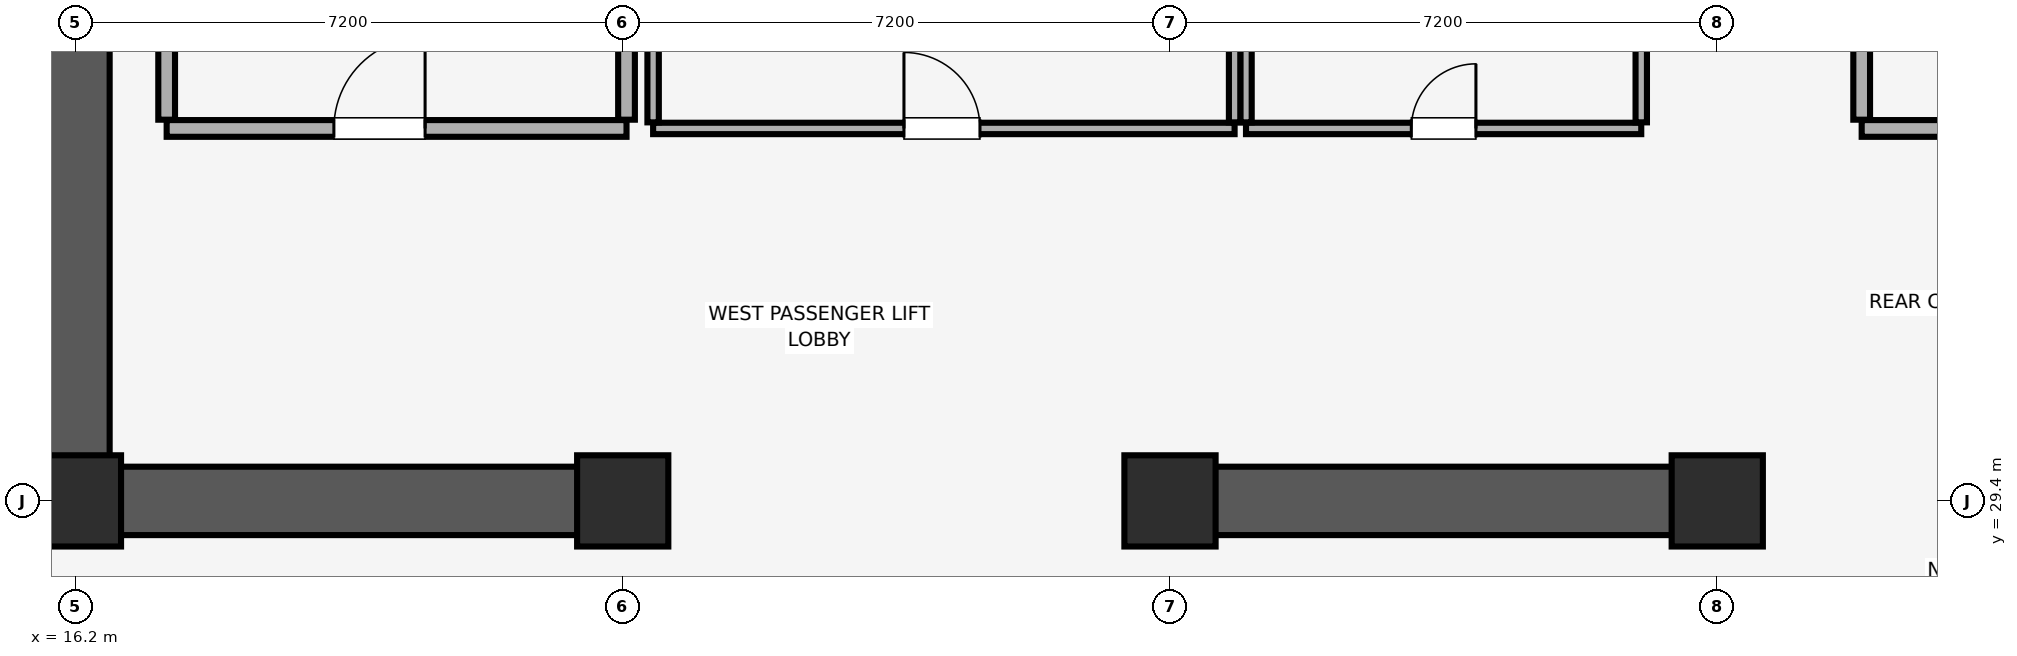
"""IFC4 building model, lengths in metres.
Left out: names, types, materials, properties, quantities, classifications, styles, units other than length and angle.
Written with IfcOpenShell. Run it as: python <this file> out.ifc"""

import sys

from ifc_helpers import new_model, si_unit, direction, frame, frame_2d, origin, origin_2d, place, context, subcontext, project, spatial, rectangle, extrude, element, fill, save


model = new_model("IFC4")
c1 = context("Model", 3, precision=1e-05, world=origin(), true_north=direction((0.0, 1.0)))
c2 = subcontext(c1, "Body", "Model", "MODEL_VIEW")
j1 = project(units=[si_unit("LENGTHUNIT", "METRE"), si_unit("PLANEANGLEUNIT", "RADIAN")], contexts=[c1])
p1 = place(None, origin())
s1 = spatial("IfcSite", under=j1, at=p1, CompositionType="ELEMENT")
p2 = place(p1, origin())
s2 = spatial("IfcBuilding", under=s1, at=p2, CompositionType="ELEMENT")
p3 = place(p2, frame((0.0, 0.0, 180.95)))
s3 = spatial("IfcBuildingStorey", under=s2, at=p3, CompositionType="ELEMENT", Elevation=180.95)
for number, where, z_axis, x_axis in (
    (1, (16.2, 29.4, 0.0), (0.0, 0.0, 1.0), (1.0, 0.0, 0.0)),
    (2, (23.4, 29.4, 0.0), (0.0, 0.0, 1.0), (1.0, 0.0, 0.0)),
    (3, (30.6, 29.4, 0.0), (0.0, 0.0, 1.0), (1.0, 0.0, 0.0)),
    (4, (37.8, 29.4, 0.0), (0.0, 0.0, 1.0), (1.0, 0.0, 0.0)),
):
    element("IfcColumn", number, at=place(p3, frame(where, z_axis=z_axis, x_axis=x_axis)), inside=s3, PredefinedType="COLUMN", context=c2, shape_type="SweptSolid", body=[
        extrude(rectangle(XDim=1.2, YDim=1.2, at=origin_2d()), origin(), (0.0, 0.0, 1.0), 3.45),
    ])
p4 = place(p3, frame((16.2, 29.4, 0.0), z_axis=(0.0, 0.0, 1.0), x_axis=(0.0, 1.0, 0.0)))
e5 = element("IfcWall", 5, at=p4, inside=s3, PredefinedType="SHEAR", context=c2, shape_type="SweptSolid", body=[
    extrude(rectangle(XDim=19.2, YDim=0.9, at=frame_2d((9.6, 0.0))), origin(), (0.0, 0.0, 1.0), 3.45),
])
p5 = place(p3, frame((16.655, 29.4, 0.0), z_axis=(0.0, 0.0, 1.0), x_axis=(1.0, 0.0, 0.0)))
e6 = element("IfcWall", 6, at=p5, inside=s3, PredefinedType="SHEAR", context=c2, shape_type="SweptSolid", body=[
    extrude(rectangle(XDim=6.945, YDim=0.9, at=frame_2d((3.473, 0.0))), origin(), (0.0, 0.0, 1.0), 3.45),
])
p6 = place(p3, frame((30.4, 29.4, 0.0), z_axis=(0.0, 0.0, 1.0), x_axis=(1.0, 0.0, 0.0)))
e7 = element("IfcWall", 7, at=p6, inside=s3, PredefinedType="SHEAR", context=c2, shape_type="SweptSolid", body=[
    extrude(rectangle(XDim=7.6, YDim=0.9, at=frame_2d((3.8, 0.0))), origin(), (0.0, 0.0, 1.0), 3.45),
])
p7 = place(p3, frame((17.4, 34.3, 0.0), z_axis=(0.0, 0.0, 1.0), x_axis=(1.0, 0.0, 0.0)))
e8 = element("IfcWall", 8, at=p7, inside=s3, PredefinedType="PARTITIONING", context=c2, shape_type="SweptSolid", body=[
    extrude(rectangle(XDim=6.05, YDim=0.22, at=frame_2d((3.025, 0.0))), origin(), (0.0, 0.0, 1.0), 3.45),
])
p8 = place(p7, frame((2.2, 0.0, 0.0)))
e9 = element("IfcOpeningElement", 9, at=p8, cuts=e8, PredefinedType="OPENING", context=c2, shape_type="SweptSolid", body=[
    extrude(rectangle(XDim=1.2, YDim=2.15, at=frame_2d((0.6, 1.075))), frame((0.0, 0.12, 0.0), z_axis=(0.0, -1.0, 0.0), x_axis=(1.0, 0.0, 0.0)), (0.0, 0.0, 1.0), 0.24),
])
p9 = place(p3, frame((17.4, 34.415, 0.0), z_axis=(0.0, 0.0, 1.0), x_axis=(0.0, 1.0, 0.0)))
e10 = element("IfcWall", 10, at=p9, inside=s3, PredefinedType="PARTITIONING", context=c2, shape_type="SweptSolid", body=[
    extrude(rectangle(XDim=5.43, YDim=0.22, at=frame_2d((2.715, 0.0))), origin(), (0.0, 0.0, 1.0), 3.45),
])
p10 = place(p3, frame((23.45, 34.415, 0.0), z_axis=(0.0, 0.0, 1.0), x_axis=(0.0, 1.0, 0.0)))
e11 = element("IfcWall", 11, at=p10, inside=s3, PredefinedType="PARTITIONING", context=c2, shape_type="SweptSolid", body=[
    extrude(rectangle(XDim=5.64, YDim=0.22, at=frame_2d((2.82, 0.0))), origin(), (0.0, 0.0, 1.0), 3.45),
])
p11 = place(p3, frame((39.7, 34.3, 0.0), z_axis=(0.0, 0.0, 1.0), x_axis=(1.0, 0.0, 0.0)))
e12 = element("IfcWall", 12, at=p11, inside=s3, PredefinedType="PARTITIONING", context=c2, shape_type="SweptSolid", body=[
    extrude(rectangle(XDim=4.6, YDim=0.22, at=frame_2d((2.3, 0.0))), origin(), (0.0, 0.0, 1.0), 3.45),
])
p12 = place(p11, frame((1.7, 0.0, 0.0)))
e13 = element("IfcOpeningElement", 13, at=p12, cuts=e12, PredefinedType="OPENING", context=c2, shape_type="SweptSolid", body=[
    extrude(rectangle(XDim=1.2, YDim=2.15, at=frame_2d((0.6, 1.075))), frame((0.0, 0.12, 0.0), z_axis=(0.0, -1.0, 0.0), x_axis=(1.0, 0.0, 0.0)), (0.0, 0.0, 1.0), 0.24),
])
p13 = place(p3, frame((39.7, 34.415, 0.0), z_axis=(0.0, 0.0, 1.0), x_axis=(0.0, 1.0, 0.0)))
e14 = element("IfcWall", 14, at=p13, inside=s3, PredefinedType="PARTITIONING", context=c2, shape_type="SweptSolid", body=[
    extrude(rectangle(XDim=5.785, YDim=0.22, at=frame_2d((2.893, 0.0))), origin(), (0.0, 0.0, 1.0), 3.45),
])
p14 = place(p3, frame((31.6, 34.3, 0.0), z_axis=(0.0, 0.0, 1.0), x_axis=(1.0, 0.0, 0.0)))
e15 = element("IfcWall", 15, at=p14, inside=s3, PredefinedType="PARTITIONING", context=c2, shape_type="SweptSolid", body=[
    extrude(rectangle(XDim=5.2, YDim=0.15, at=frame_2d((2.6, 0.0))), origin(), (0.0, 0.0, 1.0), 3.45),
])
p15 = place(p14, frame((2.175, 0.0, 0.0)))
e16 = element("IfcOpeningElement", 16, at=p15, cuts=e15, PredefinedType="OPENING", context=c2, shape_type="SweptSolid", body=[
    extrude(rectangle(XDim=0.85, YDim=2.1, at=frame_2d((0.425, 1.05))), frame((0.0, 0.085, 0.0), z_axis=(0.0, -1.0, 0.0), x_axis=(1.0, 0.0, 0.0)), (0.0, 0.0, 1.0), 0.17),
])
for number, where, z_axis, x_axis in (
    (17, (31.6, 34.38, 0.0), (0.0, 0.0, 1.0), (0.0, 1.0, 0.0)),
    (18, (36.8, 34.38, 0.0), (0.0, 0.0, 1.0), (0.0, 1.0, 0.0)),
):
    element("IfcWall", number, at=place(p3, frame(where, z_axis=z_axis, x_axis=x_axis)), inside=s3, PredefinedType="PARTITIONING", context=c2, shape_type="SweptSolid", body=[
        extrude(rectangle(XDim=4.94, YDim=0.15, at=frame_2d((2.47, 0.0))), origin(), (0.0, 0.0, 1.0), 3.45),
    ])
p16 = place(p3, frame((23.8, 34.3, 0.0), z_axis=(0.0, 0.0, 1.0), x_axis=(1.0, 0.0, 0.0)))
e19 = element("IfcWall", 19, at=p16, inside=s3, PredefinedType="PARTITIONING", context=c2, shape_type="SweptSolid", body=[
    extrude(rectangle(XDim=7.65, YDim=0.15, at=frame_2d((3.825, 0.0))), origin(), (0.0, 0.0, 1.0), 3.45),
])
p17 = place(p16, frame((3.3, 0.0, 0.0)))
e20 = element("IfcOpeningElement", 20, at=p17, cuts=e19, PredefinedType="OPENING", context=c2, shape_type="SweptSolid", body=[
    extrude(rectangle(XDim=1.0, YDim=2.15, at=frame_2d((0.5, 1.075))), frame((0.0, 0.085, 0.0), z_axis=(0.0, -1.0, 0.0), x_axis=(1.0, 0.0, 0.0)), (0.0, 0.0, 1.0), 0.17),
])
for number, where, z_axis, x_axis in (
    (21, (23.8, 34.38, 0.0), (0.0, 0.0, 1.0), (0.0, 1.0, 0.0)),
    (22, (31.45, 34.38, 0.0), (0.0, 0.0, 1.0), (0.0, 1.0, 0.0)),
):
    element("IfcWall", number, at=place(p3, frame(where, z_axis=z_axis, x_axis=x_axis)), inside=s3, PredefinedType="PARTITIONING", context=c2, shape_type="SweptSolid", body=[
        extrude(rectangle(XDim=4.94, YDim=0.15, at=frame_2d((2.47, 0.0))), origin(), (0.0, 0.0, 1.0), 3.45),
    ])
p18 = place(p8, origin())
e23 = element("IfcDoor", 23, at=p18, inside=s3, OperationType="SINGLE_SWING_RIGHT", PredefinedType="DOOR", context=c2, shape_type="SweptSolid", body=[
    extrude(rectangle(XDim=1.2, YDim=2.15, at=frame_2d((0.6, 1.075))), frame((0.0, 0.025, 0.0), z_axis=(0.0, -1.0, 0.0), x_axis=(1.0, 0.0, 0.0)), (0.0, 0.0, 1.0), 0.05),
])
fill(e9, e23)
p19 = place(p15, origin())
e24 = element("IfcDoor", 24, at=p19, inside=s3, OperationType="SINGLE_SWING_RIGHT", PredefinedType="DOOR", context=c2, shape_type="SweptSolid", body=[
    extrude(rectangle(XDim=0.85, YDim=2.1, at=frame_2d((0.425, 1.05))), frame((0.0, 0.025, 0.0), z_axis=(0.0, -1.0, 0.0), x_axis=(1.0, 0.0, 0.0)), (0.0, 0.0, 1.0), 0.05),
])
fill(e16, e24)
p20 = place(p17, origin())
e25 = element("IfcDoor", 25, at=p20, inside=s3, OperationType="SINGLE_SWING_LEFT", PredefinedType="DOOR", context=c2, shape_type="SweptSolid", body=[
    extrude(rectangle(XDim=1.0, YDim=2.15, at=frame_2d((0.5, 1.075))), frame((0.0, 0.025, 0.0), z_axis=(0.0, -1.0, 0.0), x_axis=(1.0, 0.0, 0.0)), (0.0, 0.0, 1.0), 0.05),
])
fill(e20, e25)
save(model, sys.argv[1])
